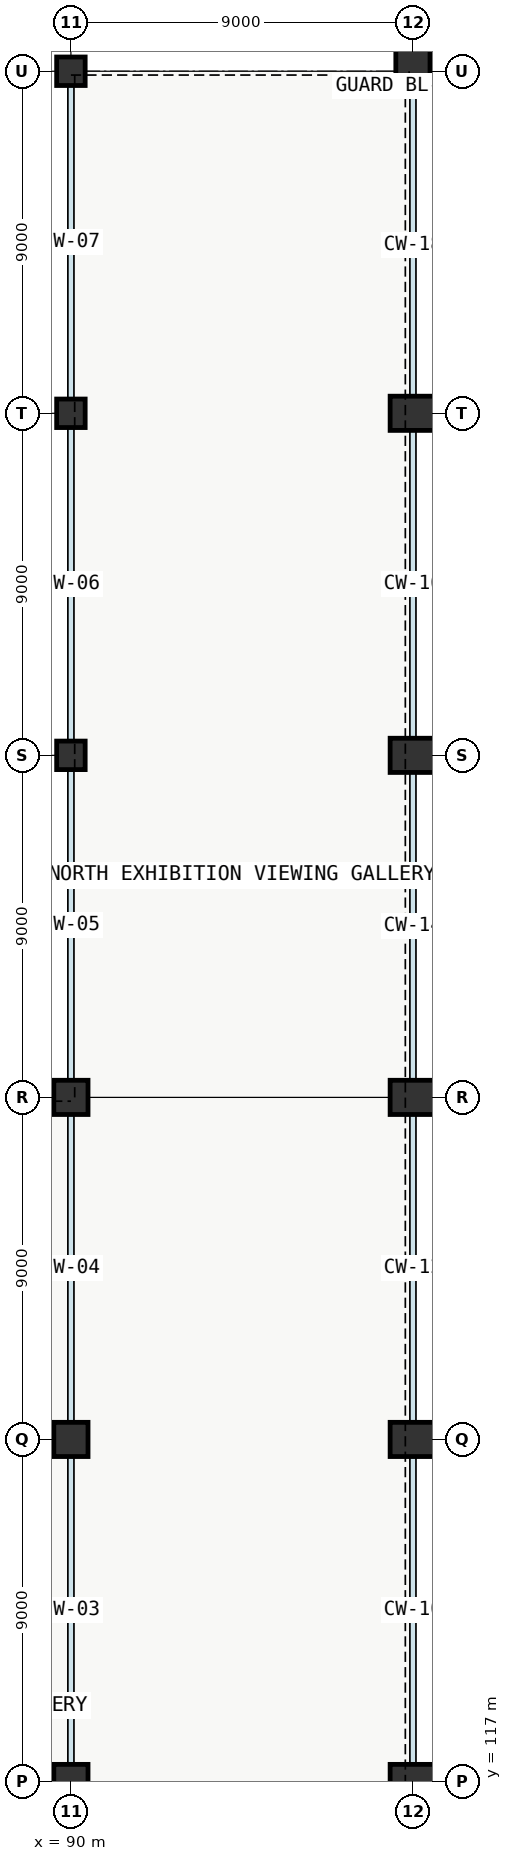
"""IFC4 building model, lengths in metres.
Left out: names, types, materials, properties, quantities, classifications, styles, units other than length and angle.
Written with IfcOpenShell. Run it as: python <this file> out.ifc"""

import sys

from ifc_helpers import new_model, si_unit, direction, frame, origin, origin_2d, place, context, subcontext, project, spatial, rectangle, extrude, element, save


model = new_model("IFC4")
c1 = context("Model", 3, precision=1e-05, world=origin(), true_north=direction((0.0, 1.0)))
c2 = subcontext(c1, "Body", "Model", "MODEL_VIEW")
j1 = project(units=[si_unit("LENGTHUNIT", "METRE"), si_unit("PLANEANGLEUNIT", "RADIAN")], contexts=[c1])
p1 = place(None, origin())
s1 = spatial("IfcSite", under=j1, at=p1, CompositionType="ELEMENT")
p2 = place(p1, origin())
s2 = spatial("IfcBuilding", under=s1, at=p2, CompositionType="ELEMENT")
p3 = place(p2, frame((0.0, 0.0, 6.0)))
s3 = spatial("IfcBuildingStorey", under=s2, at=p3, CompositionType="ELEMENT", Elevation=6.0)
for number, where, z_axis, x_axis in (
    (1, (90.0, 117.0, 0.0), (0.0, 0.0, 1.0), (1.0, 0.0, 0.0)),
    (2, (90.0, 126.0, 0.0), (0.0, 0.0, 1.0), (1.0, 0.0, 0.0)),
    (3, (90.0, 135.0, 0.0), (0.0, 0.0, 1.0), (1.0, 0.0, 0.0)),
):
    element("IfcColumn", number, at=place(p3, frame(where, z_axis=z_axis, x_axis=x_axis)), inside=s3, PredefinedType="COLUMN", context=c2, shape_type="SweptSolid", body=[
        extrude(rectangle(XDim=0.9, YDim=0.9, at=origin_2d()), origin(), (0.0, 0.0, 1.0), 6.0),
    ])
for number, where, z_axis, x_axis in (
    (4, (90.0, 144.0, 0.0), (0.0, 0.0, 1.0), (1.0, 0.0, 0.0)),
    (5, (90.0, 153.0, 0.0), (0.0, 0.0, 1.0), (1.0, 0.0, 0.0)),
    (6, (90.0, 162.0, 0.0), (0.0, 0.0, 1.0), (1.0, 0.0, 0.0)),
):
    element("IfcColumn", number, at=place(p3, frame(where, z_axis=z_axis, x_axis=x_axis)), inside=s3, PredefinedType="COLUMN", context=c2, shape_type="SweptSolid", body=[
        extrude(rectangle(XDim=0.75, YDim=0.75, at=origin_2d()), origin(), (0.0, 0.0, 1.0), 6.0),
    ])
for number, where, z_axis, x_axis in (
    (7, (99.0, 117.0, 0.0), (0.0, 0.0, 1.0), (1.0, 0.0, 0.0)),
    (8, (99.0, 126.0, 0.0), (0.0, 0.0, 1.0), (1.0, 0.0, 0.0)),
    (9, (99.0, 135.0, 0.0), (0.0, 0.0, 1.0), (1.0, 0.0, 0.0)),
    (10, (99.0, 144.0, 0.0), (0.0, 0.0, 1.0), (1.0, 0.0, 0.0)),
    (11, (99.0, 153.0, 0.0), (0.0, 0.0, 1.0), (1.0, 0.0, 0.0)),
    (12, (99.0, 162.0, 0.0), (0.0, 0.0, 1.0), (0.0, 1.0, 0.0)),
):
    element("IfcColumn", number, at=place(p3, frame(where, z_axis=z_axis, x_axis=x_axis)), inside=s3, PredefinedType="COLUMN", context=c2, shape_type="SweptSolid", body=[
        extrude(rectangle(XDim=1.2, YDim=0.9, at=origin_2d()), origin(), (0.0, 0.0, 1.0), 6.0),
    ])
save(model, sys.argv[1])
